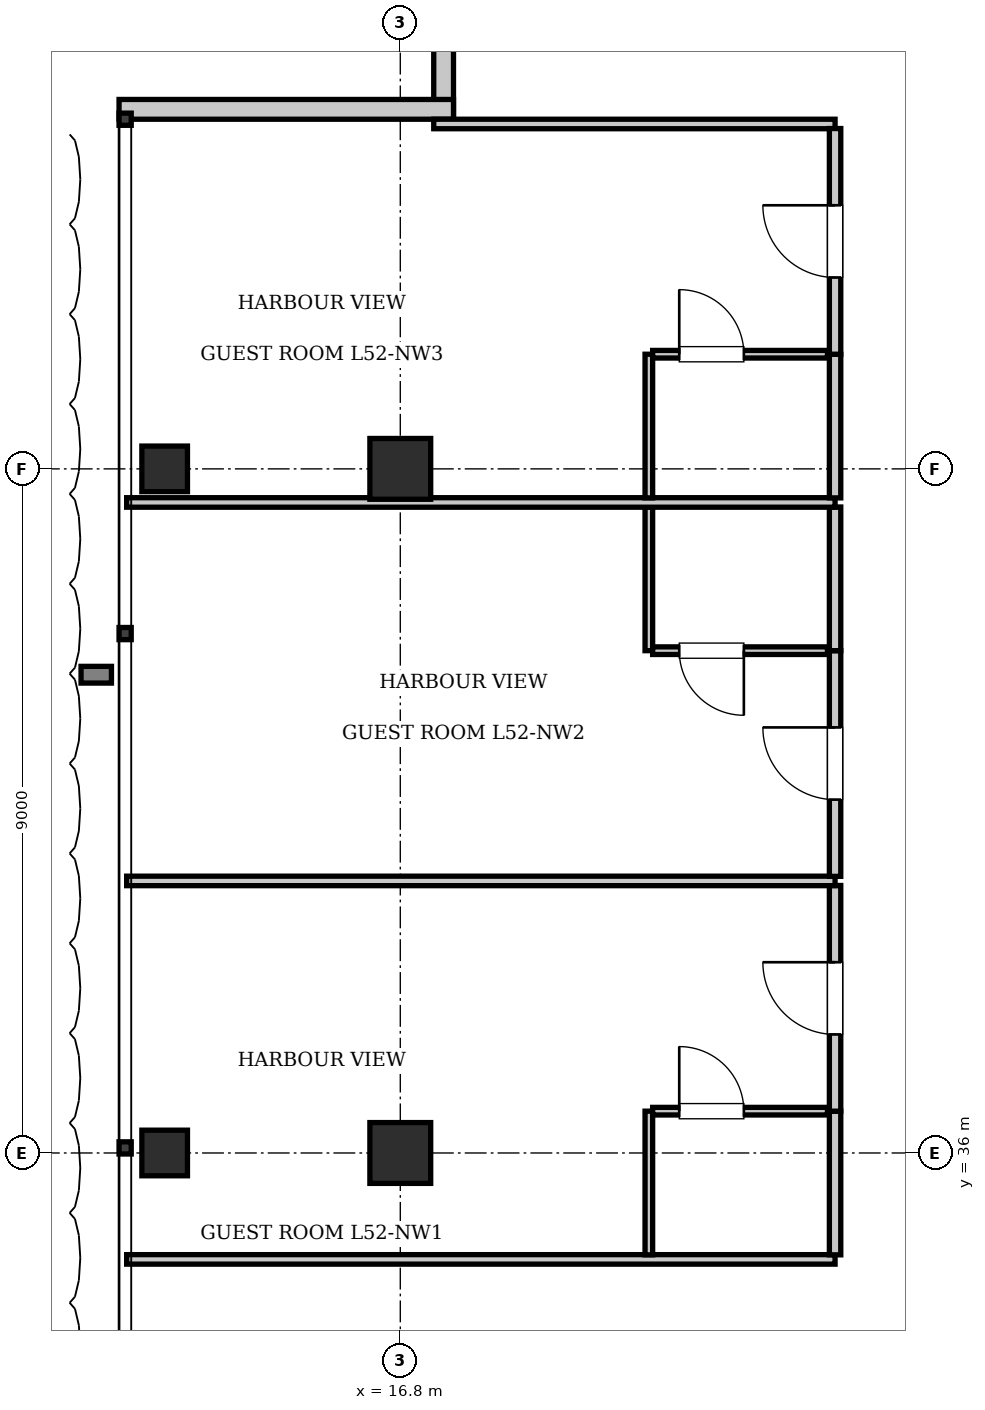
"""IFC4 building model, lengths in metres.
Left out: names, types, materials, properties, quantities, classifications, styles, units other than length and angle.
Written with IfcOpenShell. Run it as: python <this file> out.ifc"""

import sys

from ifc_helpers import new_model, si_unit, direction, frame, frame_2d, origin, origin_2d, place, context, subcontext, project, spatial, rectangle, i_section, extrude, element, fill, save


model = new_model("IFC4")
c1 = context("Model", 3, precision=1e-05, world=origin(), true_north=direction((0.0, 1.0)))
c2 = subcontext(c1, "Body", "Model", "MODEL_VIEW")
j1 = project(units=[si_unit("LENGTHUNIT", "METRE"), si_unit("PLANEANGLEUNIT", "RADIAN")], contexts=[c1])
p1 = place(None, origin())
s1 = spatial("IfcSite", under=j1, at=p1, CompositionType="ELEMENT")
p2 = place(p1, origin())
s2 = spatial("IfcBuilding", under=s1, at=p2, CompositionType="ELEMENT")
p3 = place(p2, frame((0.0, 0.0, 212.1)))
s3 = spatial("IfcBuildingStorey", under=s2, at=p3, CompositionType="ELEMENT", Elevation=212.1)
for number, where, z_axis, x_axis in (
    (1, (16.8, 36.0, 0.0), (0.0, 0.0, 1.0), (1.0, 0.0, 0.0)),
    (2, (16.8, 45.0, 0.0), (0.0, 0.0, 1.0), (1.0, 0.0, 0.0)),
):
    element("IfcColumn", number, at=place(p3, frame(where, z_axis=z_axis, x_axis=x_axis)), inside=s3, PredefinedType="COLUMN", context=c2, shape_type="SweptSolid", body=[
        extrude(rectangle(XDim=0.8, YDim=0.8, at=origin_2d()), origin(), (0.0, 0.0, 1.0), 3.85),
    ])
for number, where, z_axis, x_axis in (
    (3, (13.7, 36.0, 0.0), (0.0, 0.0, 1.0), (1.0, 0.0, 0.0)),
    (4, (13.7, 45.0, 0.0), (0.0, 0.0, 1.0), (1.0, 0.0, 0.0)),
):
    element("IfcColumn", number, at=place(p3, frame(where, z_axis=z_axis, x_axis=x_axis)), inside=s3, PredefinedType="COLUMN", context=c2, shape_type="SweptSolid", body=[
        extrude(i_section(OverallWidth=0.6, OverallDepth=0.6, WebThickness=0.025, FlangeThickness=0.038, at=origin_2d()), origin(), (0.0, 0.0, 1.0), 3.85),
    ])
for number, where, z_axis, x_axis in (
    (5, (17.37, 49.6, 0.0), (0.0, 0.0, 1.0), (0.0, 1.0, 0.0)),
    (6, (13.1, 49.73, 0.0), (0.0, 0.0, 1.0), (1.0, 0.0, 0.0)),
):
    element("IfcWall", number, at=place(p3, frame(where, z_axis=z_axis, x_axis=x_axis)), inside=s3, PredefinedType="SOLIDWALL", context=c2, shape_type="SweptSolid", body=[
        extrude(rectangle(XDim=4.4, YDim=0.26, at=frame_2d((2.2, 0.0))), origin(), (0.0, 0.0, 1.0), 3.61),
    ])
p4 = place(p3, frame((13.2, 34.6, 0.0), z_axis=(0.0, 0.0, 1.0), x_axis=(1.0, 0.0, 0.0)))
e7 = element("IfcWall", 7, at=p4, inside=s3, PredefinedType="PARTITIONING", context=c2, shape_type="SweptSolid", body=[
    extrude(rectangle(XDim=9.32, YDim=0.125, at=frame_2d((4.66, 0.0))), origin(), (0.0, 0.0, 1.0), 3.61),
])
p5 = place(p3, frame((17.24, 49.538, 0.0), z_axis=(0.0, 0.0, 1.0), x_axis=(1.0, 0.0, 0.0)))
e8 = element("IfcWall", 8, at=p5, inside=s3, PredefinedType="PARTITIONING", context=c2, shape_type="SweptSolid", body=[
    extrude(rectangle(XDim=5.28, YDim=0.125, at=frame_2d((2.64, 0.0))), origin(), (0.0, 0.0, 1.0), 3.61),
])
p6 = place(p3, frame((22.52, 34.66, 0.0), z_axis=(0.0, 0.0, 1.0), x_axis=(0.0, 1.0, 0.0)))
e9 = element("IfcWall", 9, at=p6, inside=s3, PredefinedType="PARTITIONING", context=c2, shape_type="SweptSolid", body=[
    extrude(rectangle(XDim=1.89, YDim=0.15, at=frame_2d((0.945, 0.0))), origin(), (0.0, 0.0, 1.0), 3.61),
])
p7 = place(p3, frame((22.52, 36.55, 0.0), z_axis=(0.0, 0.0, 1.0), x_axis=(0.0, 1.0, 0.0)))
e10 = element("IfcWall", 10, at=p7, inside=s3, PredefinedType="PARTITIONING", context=c2, shape_type="SweptSolid", body=[
    extrude(rectangle(XDim=2.969, YDim=0.15, at=frame_2d((1.485, 0.0))), origin(), (0.0, 0.0, 1.0), 3.61),
])
p8 = place(p7, frame((1.01, 0.0, 0.0)))
e11 = element("IfcOpeningElement", 11, at=p8, cuts=e10, PredefinedType="OPENING", context=c2, shape_type="SweptSolid", body=[
    extrude(rectangle(XDim=0.95, YDim=2.15, at=frame_2d((0.475, 1.075))), frame((0.0, 0.085, 0.0), z_axis=(0.0, -1.0, 0.0), x_axis=(1.0, 0.0, 0.0)), (0.0, 0.0, 1.0), 0.17),
])
p9 = place(p3, frame((20.07, 34.66, 0.0), z_axis=(0.0, 0.0, 1.0), x_axis=(0.0, 1.0, 0.0)))
e12 = element("IfcWall", 12, at=p9, inside=s3, PredefinedType="PARTITIONING", context=c2, shape_type="SweptSolid", body=[
    extrude(rectangle(XDim=1.89, YDim=0.1, at=frame_2d((0.945, 0.0))), origin(), (0.0, 0.0, 1.0), 3.61),
])
p10 = place(p3, frame((20.12, 36.55, 0.0), z_axis=(0.0, 0.0, 1.0), x_axis=(1.0, 0.0, 0.0)))
e13 = element("IfcWall", 13, at=p10, inside=s3, PredefinedType="PARTITIONING", context=c2, shape_type="SweptSolid", body=[
    extrude(rectangle(XDim=2.3, YDim=0.1, at=frame_2d((1.15, 0.0))), origin(), (0.0, 0.0, 1.0), 3.61),
])
p11 = place(p10, frame((0.35, 0.0, 0.0)))
e14 = element("IfcOpeningElement", 14, at=p11, cuts=e13, PredefinedType="OPENING", context=c2, shape_type="SweptSolid", body=[
    extrude(rectangle(XDim=0.85, YDim=2.1, at=frame_2d((0.425, 1.05))), frame((0.0, 0.06, 0.0), z_axis=(0.0, -1.0, 0.0), x_axis=(1.0, 0.0, 0.0)), (0.0, 0.0, 1.0), 0.12),
])
p12 = place(p3, frame((13.2, 39.579, 0.0), z_axis=(0.0, 0.0, 1.0), x_axis=(1.0, 0.0, 0.0)))
e15 = element("IfcWall", 15, at=p12, inside=s3, PredefinedType="PARTITIONING", context=c2, shape_type="SweptSolid", body=[
    extrude(rectangle(XDim=9.32, YDim=0.125, at=frame_2d((4.66, 0.0))), origin(), (0.0, 0.0, 1.0), 3.61),
])
p13 = place(p3, frame((22.52, 39.639, 0.0), z_axis=(0.0, 0.0, 1.0), x_axis=(0.0, 1.0, 0.0)))
e16 = element("IfcWall", 16, at=p13, inside=s3, PredefinedType="PARTITIONING", context=c2, shape_type="SweptSolid", body=[
    extrude(rectangle(XDim=2.969, YDim=0.15, at=frame_2d((1.485, 0.0))), origin(), (0.0, 0.0, 1.0), 3.61),
])
p14 = place(p13, frame((1.01, 0.0, 0.0)))
e17 = element("IfcOpeningElement", 17, at=p14, cuts=e16, PredefinedType="OPENING", context=c2, shape_type="SweptSolid", body=[
    extrude(rectangle(XDim=0.95, YDim=2.15, at=frame_2d((0.475, 1.075))), frame((0.0, 0.085, 0.0), z_axis=(0.0, -1.0, 0.0), x_axis=(1.0, 0.0, 0.0)), (0.0, 0.0, 1.0), 0.17),
])
p15 = place(p3, frame((22.52, 42.608, 0.0), z_axis=(0.0, 0.0, 1.0), x_axis=(0.0, 1.0, 0.0)))
e18 = element("IfcWall", 18, at=p15, inside=s3, PredefinedType="PARTITIONING", context=c2, shape_type="SweptSolid", body=[
    extrude(rectangle(XDim=1.89, YDim=0.15, at=frame_2d((0.945, 0.0))), origin(), (0.0, 0.0, 1.0), 3.61),
])
p16 = place(p3, frame((20.07, 42.608, 0.0), z_axis=(0.0, 0.0, 1.0), x_axis=(0.0, 1.0, 0.0)))
e19 = element("IfcWall", 19, at=p16, inside=s3, PredefinedType="PARTITIONING", context=c2, shape_type="SweptSolid", body=[
    extrude(rectangle(XDim=1.89, YDim=0.1, at=frame_2d((0.945, 0.0))), origin(), (0.0, 0.0, 1.0), 3.61),
])
p17 = place(p3, frame((20.12, 42.608, 0.0), z_axis=(0.0, 0.0, 1.0), x_axis=(1.0, 0.0, 0.0)))
e20 = element("IfcWall", 20, at=p17, inside=s3, PredefinedType="PARTITIONING", context=c2, shape_type="SweptSolid", body=[
    extrude(rectangle(XDim=2.3, YDim=0.1, at=frame_2d((1.15, 0.0))), origin(), (0.0, 0.0, 1.0), 3.61),
])
p18 = place(p17, frame((0.35, 0.0, 0.0)))
e21 = element("IfcOpeningElement", 21, at=p18, cuts=e20, PredefinedType="OPENING", context=c2, shape_type="SweptSolid", body=[
    extrude(rectangle(XDim=0.85, YDim=2.1, at=frame_2d((0.425, 1.05))), frame((0.0, 0.06, 0.0), z_axis=(0.0, -1.0, 0.0), x_axis=(1.0, 0.0, 0.0)), (0.0, 0.0, 1.0), 0.12),
])
p19 = place(p3, frame((13.2, 44.558, 0.0), z_axis=(0.0, 0.0, 1.0), x_axis=(1.0, 0.0, 0.0)))
e22 = element("IfcWall", 22, at=p19, inside=s3, PredefinedType="PARTITIONING", context=c2, shape_type="SweptSolid", body=[
    extrude(rectangle(XDim=9.32, YDim=0.125, at=frame_2d((4.66, 0.0))), origin(), (0.0, 0.0, 1.0), 3.61),
])
p20 = place(p3, frame((22.52, 44.618, 0.0), z_axis=(0.0, 0.0, 1.0), x_axis=(0.0, 1.0, 0.0)))
e23 = element("IfcWall", 23, at=p20, inside=s3, PredefinedType="PARTITIONING", context=c2, shape_type="SweptSolid", body=[
    extrude(rectangle(XDim=1.89, YDim=0.15, at=frame_2d((0.945, 0.0))), origin(), (0.0, 0.0, 1.0), 3.61),
])
p21 = place(p3, frame((22.52, 46.508, 0.0), z_axis=(0.0, 0.0, 1.0), x_axis=(0.0, 1.0, 0.0)))
e24 = element("IfcWall", 24, at=p21, inside=s3, PredefinedType="PARTITIONING", context=c2, shape_type="SweptSolid", body=[
    extrude(rectangle(XDim=2.969, YDim=0.15, at=frame_2d((1.485, 0.0))), origin(), (0.0, 0.0, 1.0), 3.61),
])
p22 = place(p21, frame((1.01, 0.0, 0.0)))
e25 = element("IfcOpeningElement", 25, at=p22, cuts=e24, PredefinedType="OPENING", context=c2, shape_type="SweptSolid", body=[
    extrude(rectangle(XDim=0.95, YDim=2.15, at=frame_2d((0.475, 1.075))), frame((0.0, 0.085, 0.0), z_axis=(0.0, -1.0, 0.0), x_axis=(1.0, 0.0, 0.0)), (0.0, 0.0, 1.0), 0.17),
])
p23 = place(p3, frame((20.07, 44.618, 0.0), z_axis=(0.0, 0.0, 1.0), x_axis=(0.0, 1.0, 0.0)))
e26 = element("IfcWall", 26, at=p23, inside=s3, PredefinedType="PARTITIONING", context=c2, shape_type="SweptSolid", body=[
    extrude(rectangle(XDim=1.89, YDim=0.1, at=frame_2d((0.945, 0.0))), origin(), (0.0, 0.0, 1.0), 3.61),
])
p24 = place(p3, frame((20.12, 46.508, 0.0), z_axis=(0.0, 0.0, 1.0), x_axis=(1.0, 0.0, 0.0)))
e27 = element("IfcWall", 27, at=p24, inside=s3, PredefinedType="PARTITIONING", context=c2, shape_type="SweptSolid", body=[
    extrude(rectangle(XDim=2.3, YDim=0.1, at=frame_2d((1.15, 0.0))), origin(), (0.0, 0.0, 1.0), 3.61),
])
p25 = place(p24, frame((0.35, 0.0, 0.0)))
e28 = element("IfcOpeningElement", 28, at=p25, cuts=e27, PredefinedType="OPENING", context=c2, shape_type="SweptSolid", body=[
    extrude(rectangle(XDim=0.85, YDim=2.1, at=frame_2d((0.425, 1.05))), frame((0.0, 0.06, 0.0), z_axis=(0.0, -1.0, 0.0), x_axis=(1.0, 0.0, 0.0)), (0.0, 0.0, 1.0), 0.12),
])
p26 = place(p11, origin())
e29 = element("IfcDoor", 29, at=p26, inside=s3, OperationType="SINGLE_SWING_LEFT", PredefinedType="DOOR", context=c2, shape_type="SweptSolid", body=[
    extrude(rectangle(XDim=0.85, YDim=2.1, at=frame_2d((0.425, 1.05))), frame((0.0, 0.025, 0.0), z_axis=(0.0, -1.0, 0.0), x_axis=(1.0, 0.0, 0.0)), (0.0, 0.0, 1.0), 0.05),
])
fill(e14, e29)
p27 = place(p8, origin())
e30 = element("IfcDoor", 30, at=p27, inside=s3, OperationType="SINGLE_SWING_RIGHT", PredefinedType="DOOR", context=c2, shape_type="SweptSolid", body=[
    extrude(rectangle(XDim=0.95, YDim=2.15, at=frame_2d((0.475, 1.075))), frame((0.0, 0.025, 0.0), z_axis=(0.0, -1.0, 0.0), x_axis=(1.0, 0.0, 0.0)), (0.0, 0.0, 1.0), 0.05),
])
fill(e11, e30)
p28 = place(p18, frame((0.85, 0.0, 0.0), z_axis=(0.0, 0.0, 1.0), x_axis=(-1.0, 0.0, 0.0)))
e31 = element("IfcDoor", 31, at=p28, inside=s3, OperationType="SINGLE_SWING_LEFT", PredefinedType="DOOR", context=c2, shape_type="SweptSolid", body=[
    extrude(rectangle(XDim=0.85, YDim=2.1, at=frame_2d((0.425, 1.05))), frame((0.0, 0.025, 0.0), z_axis=(0.0, -1.0, 0.0), x_axis=(1.0, 0.0, 0.0)), (0.0, 0.0, 1.0), 0.05),
])
fill(e21, e31)
p29 = place(p14, origin())
e32 = element("IfcDoor", 32, at=p29, inside=s3, OperationType="SINGLE_SWING_RIGHT", PredefinedType="DOOR", context=c2, shape_type="SweptSolid", body=[
    extrude(rectangle(XDim=0.95, YDim=2.15, at=frame_2d((0.475, 1.075))), frame((0.0, 0.025, 0.0), z_axis=(0.0, -1.0, 0.0), x_axis=(1.0, 0.0, 0.0)), (0.0, 0.0, 1.0), 0.05),
])
fill(e17, e32)
p30 = place(p25, origin())
e33 = element("IfcDoor", 33, at=p30, inside=s3, OperationType="SINGLE_SWING_LEFT", PredefinedType="DOOR", context=c2, shape_type="SweptSolid", body=[
    extrude(rectangle(XDim=0.85, YDim=2.1, at=frame_2d((0.425, 1.05))), frame((0.0, 0.025, 0.0), z_axis=(0.0, -1.0, 0.0), x_axis=(1.0, 0.0, 0.0)), (0.0, 0.0, 1.0), 0.05),
])
fill(e28, e33)
p31 = place(p22, origin())
e34 = element("IfcDoor", 34, at=p31, inside=s3, OperationType="SINGLE_SWING_RIGHT", PredefinedType="DOOR", context=c2, shape_type="SweptSolid", body=[
    extrude(rectangle(XDim=0.95, YDim=2.15, at=frame_2d((0.475, 1.075))), frame((0.0, 0.025, 0.0), z_axis=(0.0, -1.0, 0.0), x_axis=(1.0, 0.0, 0.0)), (0.0, 0.0, 1.0), 0.05),
])
fill(e25, e34)
save(model, sys.argv[1])
